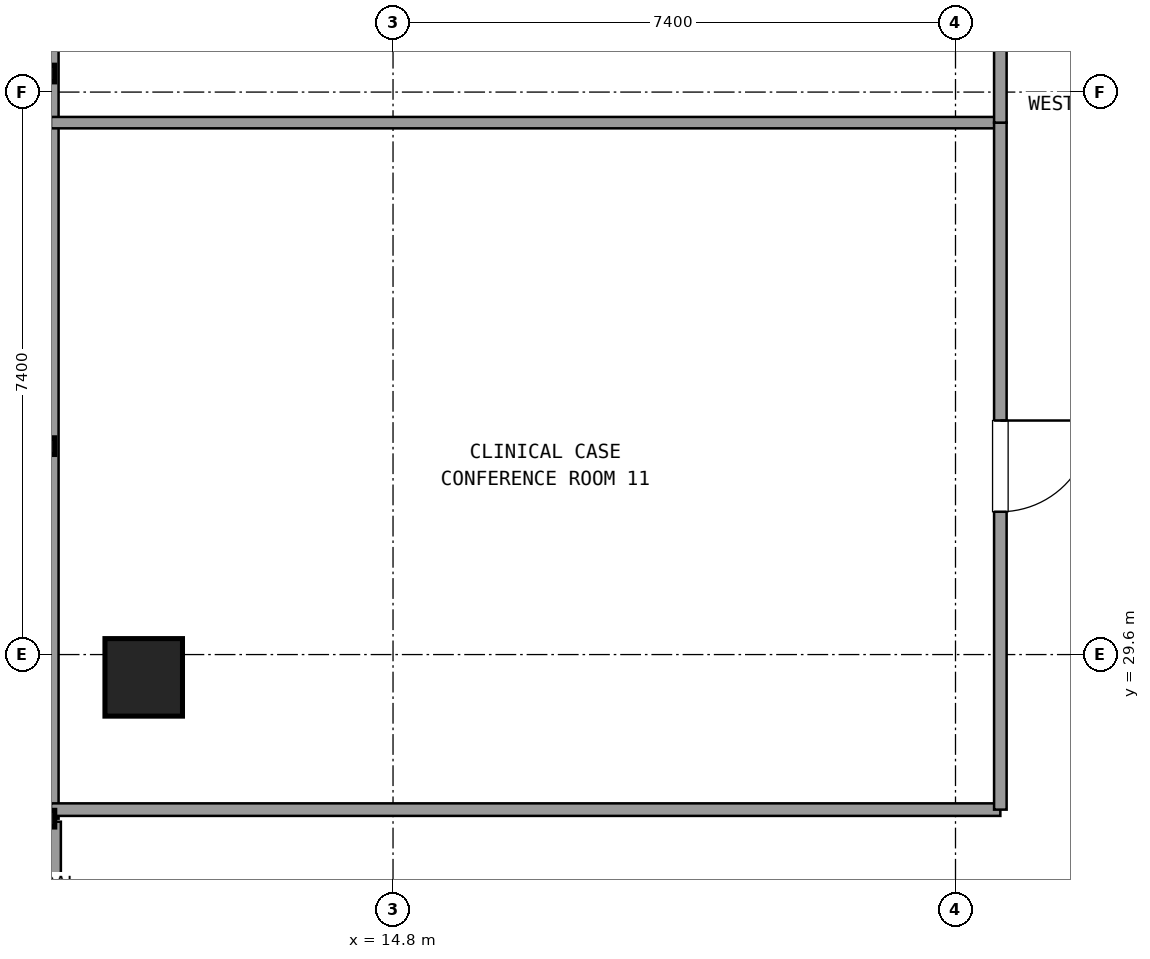
"""IFC4 building model, lengths in metres.
Left out: names, types, materials, properties, quantities, classifications, styles, units other than length and angle.
Written with IfcOpenShell. Run it as: python <this file> out.ifc"""

import sys

from ifc_helpers import new_model, si_unit, direction, frame, frame_2d, origin, origin_2d, place, context, subcontext, project, spatial, rectangle, extrude, element, fill, save


model = new_model("IFC4")
c1 = context("Model", 3, precision=1e-05, world=origin(), true_north=direction((0.0, 1.0)))
c2 = subcontext(c1, "Body", "Model", "MODEL_VIEW")
j1 = project(units=[si_unit("LENGTHUNIT", "METRE"), si_unit("PLANEANGLEUNIT", "RADIAN")], contexts=[c1])
p1 = place(None, origin())
s1 = spatial("IfcSite", under=j1, at=p1, CompositionType="ELEMENT")
p2 = place(p1, origin())
s2 = spatial("IfcBuilding", under=s1, at=p2, CompositionType="ELEMENT")
p3 = place(p2, frame((0.0, 0.0, 84.78)))
s3 = spatial("IfcBuildingStorey", under=s2, at=p3, CompositionType="ELEMENT", Elevation=84.78)
p4 = place(p3, frame((11.52, 29.3, 0.0), z_axis=(0.0, 0.0, 1.0), x_axis=(1.0, 0.0, 0.0)))
e1 = element("IfcColumn", 1, at=p4, inside=s3, PredefinedType="COLUMN", context=c2, shape_type="SweptSolid", body=[
    extrude(rectangle(XDim=1.02, YDim=1.02, at=origin_2d()), origin(), (0.0, 0.0, 1.0), 3.578),
])
p5 = place(p3, frame((10.28, 27.401, 0.0), z_axis=(0.0, 0.0, 1.0), x_axis=(0.0, -1.0, 0.0)))
e2 = element("IfcWall", 2, at=p5, inside=s3, PredefinedType="SOLIDWALL", context=c2, shape_type="SweptSolid", body=[
    extrude(rectangle(XDim=3.0, YDim=0.3, at=frame_2d((1.5, 0.0))), origin(), (0.0, 0.0, 1.0), 2.67),
])
p6 = place(p5, frame((0.9, 0.0, 0.0)))
e3 = element("IfcOpeningElement", 3, at=p6, cuts=e2, PredefinedType="OPENING", context=c2, shape_type="SweptSolid", body=[
    extrude(rectangle(XDim=1.2, YDim=2.2, at=frame_2d((0.6, 1.1))), frame((0.0, 0.16, 0.0), z_axis=(0.0, -1.0, 0.0), x_axis=(1.0, 0.0, 0.0)), (0.0, 0.0, 1.0), 0.32),
])
p7 = place(p3, frame((10.28, 42.145, 0.0), z_axis=(0.0, 0.0, 1.0), x_axis=(0.0, -1.0, 0.0)))
e4 = element("IfcWall", 4, at=p7, inside=s3, PredefinedType="SOLIDWALL", context=c2, shape_type="SweptSolid", body=[
    extrude(rectangle(XDim=14.704, YDim=0.24, at=frame_2d((7.352, 0.0))), origin(), (0.0, 0.0, 1.0), 0.85),
])
p8 = place(p3, frame((10.3, 27.56, 0.0), z_axis=(0.0, 0.0, 1.0), x_axis=(1.0, 0.0, 0.0)))
e5 = element("IfcWall", 5, at=p8, inside=s3, PredefinedType="PARTITIONING", context=c2, shape_type="SweptSolid", body=[
    extrude(rectangle(XDim=12.49, YDim=0.165, at=frame_2d((6.245, 0.0))), origin(), (0.0, 0.0, 1.0), 2.61),
])
p9 = place(p3, frame((22.79, 36.598, 0.0), z_axis=(0.0, 0.0, 1.0), x_axis=(-1.0, 0.0, 0.0)))
e6 = element("IfcWall", 6, at=p9, inside=s3, PredefinedType="PARTITIONING", context=c2, shape_type="SweptSolid", body=[
    extrude(rectangle(XDim=12.49, YDim=0.15, at=frame_2d((6.245, 0.0))), origin(), (0.0, 0.0, 1.0), 2.61),
])
p10 = place(p3, frame((22.79, 27.56, 0.0), z_axis=(0.0, 0.0, 1.0), x_axis=(0.0, 1.0, 0.0)))
e7 = element("IfcWall", 7, at=p10, inside=s3, PredefinedType="PARTITIONING", context=c2, shape_type="SweptSolid", body=[
    extrude(rectangle(XDim=9.038, YDim=0.165, at=frame_2d((4.519, 0.0))), origin(), (0.0, 0.0, 1.0), 2.61),
])
p11 = place(p10, frame((3.919, 0.0, 0.0)))
e8 = element("IfcOpeningElement", 8, at=p11, cuts=e7, PredefinedType="OPENING", context=c2, shape_type="SweptSolid", body=[
    extrude(rectangle(XDim=1.2, YDim=2.15, at=frame_2d((0.6, 1.075))), frame((0.0, 0.093, 0.0), z_axis=(0.0, -1.0, 0.0), x_axis=(1.0, 0.0, 0.0)), (0.0, 0.0, 1.0), 0.185),
])
p12 = place(p3, frame((22.79, 36.598, 0.0), z_axis=(0.0, 0.0, 1.0), x_axis=(0.0, 1.0, 0.0)))
e9 = element("IfcWall", 9, at=p12, inside=s3, PredefinedType="PARTITIONING", context=c2, shape_type="SweptSolid", body=[
    extrude(rectangle(XDim=11.502, YDim=0.165, at=frame_2d((5.751, 0.0))), origin(), (0.0, 0.0, 1.0), 2.61),
])
p13 = place(p12, frame((5.151, 0.0, 0.0)))
e10 = element("IfcOpeningElement", 10, at=p13, cuts=e9, PredefinedType="OPENING", context=c2, shape_type="SweptSolid", body=[
    extrude(rectangle(XDim=1.2, YDim=2.15, at=frame_2d((0.6, 1.075))), frame((0.0, 0.093, 0.0), z_axis=(0.0, -1.0, 0.0), x_axis=(1.0, 0.0, 0.0)), (0.0, 0.0, 1.0), 0.185),
])
p14 = place(p11, frame((1.2, 0.0, 0.0), z_axis=(0.0, 0.0, 1.0), x_axis=(-1.0, 0.0, 0.0)))
e11 = element("IfcDoor", 11, at=p14, inside=s3, OperationType="SINGLE_SWING_RIGHT", PredefinedType="DOOR", context=c2, shape_type="SweptSolid", body=[
    extrude(rectangle(XDim=1.2, YDim=2.15, at=frame_2d((0.6, 1.075))), frame((0.0, 0.025, 0.0), z_axis=(0.0, -1.0, 0.0), x_axis=(1.0, 0.0, 0.0)), (0.0, 0.0, 1.0), 0.05),
])
fill(e8, e11)
save(model, sys.argv[1])
